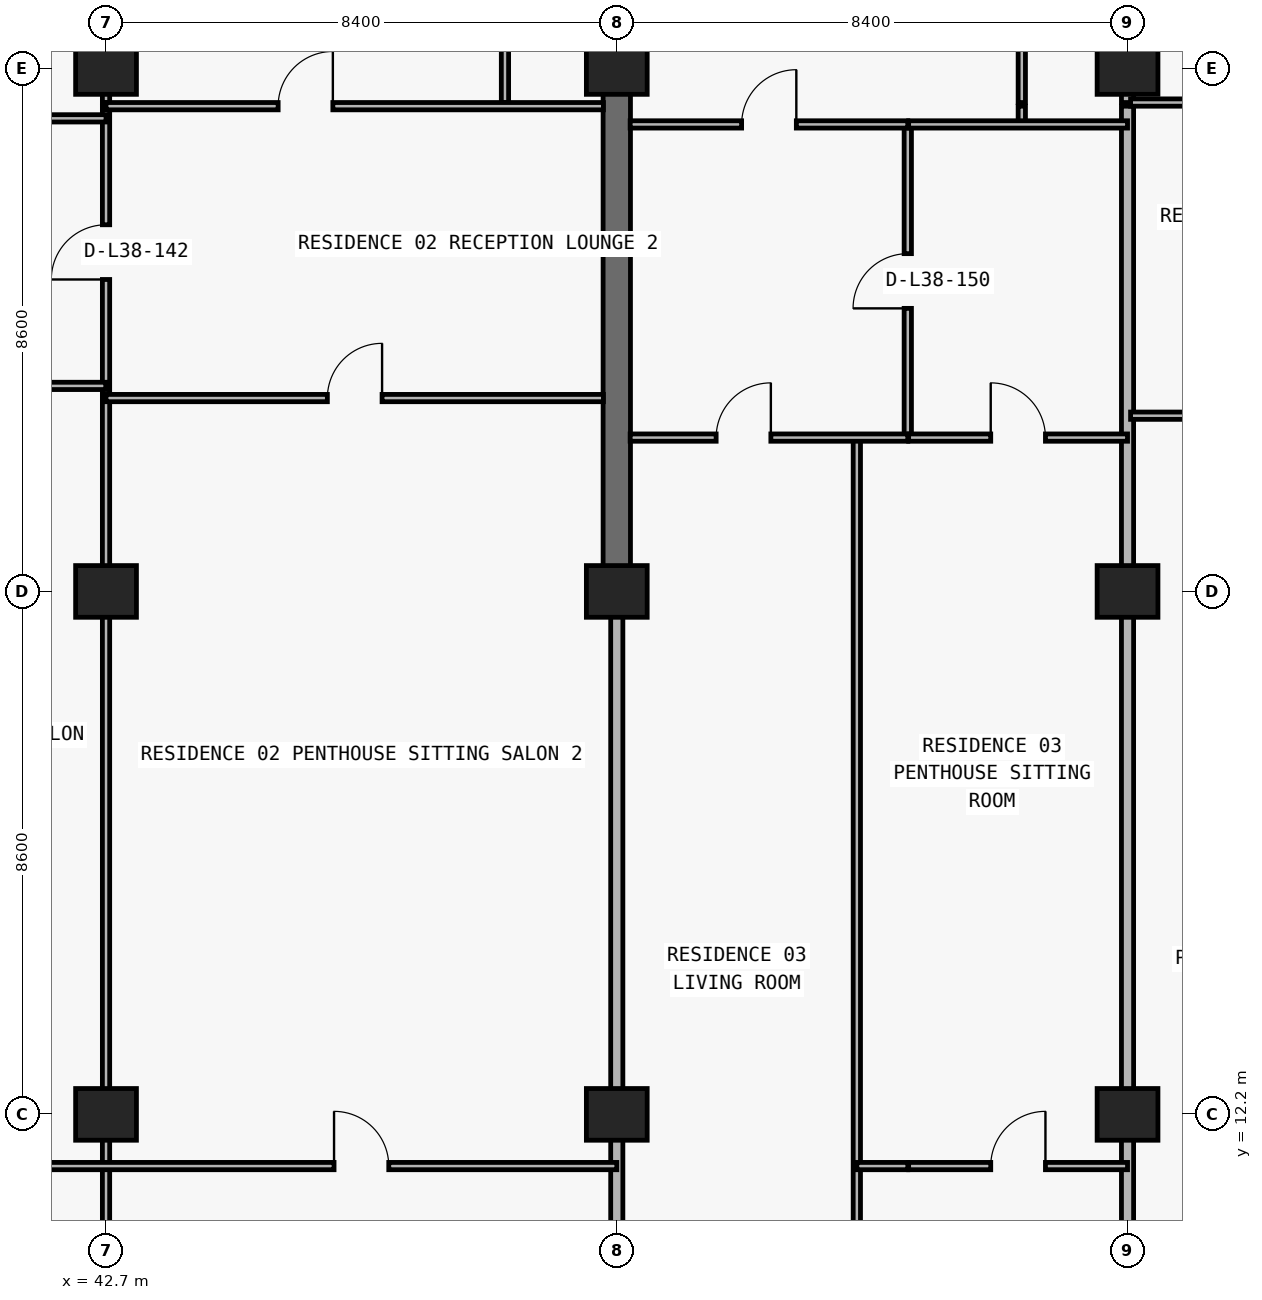
"""IFC4 building model, lengths in metres.
Left out: names, types, materials, properties, quantities, classifications, styles, units other than length and angle.
Written with IfcOpenShell. Run it as: python <this file> out.ifc"""

import sys

from ifc_helpers import new_model, si_unit, direction, frame, frame_2d, origin, origin_2d, place, context, subcontext, project, spatial, rectangle, extrude, element, fill, save


model = new_model("IFC4")
c1 = context("Model", 3, precision=1e-05, world=origin(), true_north=direction((0.0, 1.0)))
c2 = subcontext(c1, "Body", "Model", "MODEL_VIEW")
j1 = project(units=[si_unit("LENGTHUNIT", "METRE"), si_unit("PLANEANGLEUNIT", "RADIAN")], contexts=[c1])
p1 = place(None, origin())
s1 = spatial("IfcSite", under=j1, at=p1, CompositionType="ELEMENT")
p2 = place(p1, origin())
s2 = spatial("IfcBuilding", under=s1, at=p2, CompositionType="ELEMENT")
p3 = place(p2, frame((0.0, 0.0, 138.9)))
s3 = spatial("IfcBuildingStorey", under=s2, at=p3, CompositionType="ELEMENT", Elevation=138.9)
for number, where, z_axis, x_axis in (
    (1, (42.7, 12.2, 0.0), (0.0, 0.0, 1.0), (1.0, 0.0, 0.0)),
    (2, (51.1, 12.2, 0.0), (0.0, 0.0, 1.0), (1.0, 0.0, 0.0)),
    (3, (59.5, 12.2, 0.0), (0.0, 0.0, 1.0), (1.0, 0.0, 0.0)),
    (4, (42.7, 20.8, 0.0), (0.0, 0.0, 1.0), (1.0, 0.0, 0.0)),
    (5, (51.1, 20.8, 0.0), (0.0, 0.0, 1.0), (1.0, 0.0, 0.0)),
    (6, (59.5, 20.8, 0.0), (0.0, 0.0, 1.0), (1.0, 0.0, 0.0)),
    (7, (42.7, 29.4, 0.0), (0.0, 0.0, 1.0), (1.0, 0.0, 0.0)),
    (8, (51.1, 29.4, 0.0), (0.0, 0.0, 1.0), (1.0, 0.0, 0.0)),
    (9, (59.5, 29.4, 0.0), (0.0, 0.0, 1.0), (1.0, 0.0, 0.0)),
):
    element("IfcColumn", number, at=place(p3, frame(where, z_axis=z_axis, x_axis=x_axis)), inside=s3, PredefinedType="COLUMN", context=c2, shape_type="SweptSolid", body=[
        extrude(rectangle(XDim=1.0, YDim=0.85, at=origin_2d()), origin(), (0.0, 0.0, 1.0), 3.05),
    ])
p4 = place(p3, frame((51.1, 20.8, 0.0), z_axis=(0.0, 0.0, 1.0), x_axis=(0.0, 1.0, 0.0)))
e10 = element("IfcWall", 10, at=p4, inside=s3, PredefinedType="SHEAR", context=c2, shape_type="SweptSolid", body=[
    extrude(rectangle(XDim=8.6, YDim=0.45, at=frame_2d((4.3, 0.0))), origin(), (0.0, 0.0, 1.0), 3.05),
])
p5 = place(p3, frame((42.7, 8.84, 0.0), z_axis=(0.0, 0.0, 1.0), x_axis=(0.0, 1.0, 0.0)))
e11 = element("IfcWall", 11, at=p5, inside=s3, PredefinedType="PARTITIONING", context=c2, shape_type="SweptSolid", body=[
    extrude(rectangle(XDim=19.94, YDim=0.12, at=frame_2d((9.97, 0.0))), origin(), (0.0, 0.0, 1.0), 2.174),
])
p6 = place(p5, frame((17.09, 0.0, 0.0)))
e12 = element("IfcOpeningElement", 12, at=p6, cuts=e11, PredefinedType="OPENING", context=c2, shape_type="SweptSolid", body=[
    extrude(rectangle(XDim=0.9, YDim=2.124, at=frame_2d((0.45, 1.062))), frame((0.0, 0.07, 0.0), z_axis=(0.0, -1.0, 0.0), x_axis=(1.0, 0.0, 0.0)), (0.0, 0.0, 1.0), 0.14),
])
p7 = place(p3, frame((42.7, 28.84, 0.0), z_axis=(0.0, 0.0, 1.0), x_axis=(0.0, 1.0, 0.0)))
e13 = element("IfcWall", 13, at=p7, inside=s3, PredefinedType="PARTITIONING", context=c2, shape_type="SweptSolid", body=[
    extrude(rectangle(XDim=5.16, YDim=0.12, at=frame_2d((2.58, 0.0))), origin(), (0.0, 0.0, 1.0), 2.174),
])
p8 = place(p3, frame((49.261, 28.84, 0.0), z_axis=(0.0, 0.0, 1.0), x_axis=(0.0, 1.0, 0.0)))
e14 = element("IfcWall", 14, at=p8, inside=s3, PredefinedType="PARTITIONING", context=c2, shape_type="SweptSolid", body=[
    extrude(rectangle(XDim=5.16, YDim=0.12, at=frame_2d((2.58, 0.0))), origin(), (0.0, 0.0, 1.0), 3.05),
])
p9 = place(p8, frame((2.155, 0.0, 0.0)))
e15 = element("IfcOpeningElement", 15, at=p9, cuts=e14, PredefinedType="OPENING", context=c2, shape_type="SweptSolid", body=[
    extrude(rectangle(XDim=0.85, YDim=2.1, at=frame_2d((0.425, 1.05))), frame((0.0, 0.07, 0.0), z_axis=(0.0, -1.0, 0.0), x_axis=(1.0, 0.0, 0.0)), (0.0, 0.0, 1.0), 0.14),
])
p10 = place(p3, frame((51.1, 8.84, 0.0), z_axis=(0.0, 0.0, 1.0), x_axis=(0.0, 1.0, 0.0)))
e16 = element("IfcWall", 16, at=p10, inside=s3, PredefinedType="PARTITIONING", context=c2, shape_type="SweptSolid", body=[
    extrude(rectangle(XDim=11.955, YDim=0.2, at=frame_2d((5.978, 0.0))), origin(), (0.0, 0.0, 1.0), 2.174),
])
p11 = place(p3, frame((51.1, 29.405, 0.0), z_axis=(0.0, 0.0, 1.0), x_axis=(0.0, 1.0, 0.0)))
e17 = element("IfcWall", 17, at=p11, inside=s3, PredefinedType="PARTITIONING", context=c2, shape_type="SweptSolid", body=[
    extrude(rectangle(XDim=4.595, YDim=0.2, at=frame_2d((2.297, 0.0))), origin(), (0.0, 0.0, 1.0), 2.335),
])
p12 = place(p3, frame((55.048, 8.84, 0.0), z_axis=(0.0, 0.0, 1.0), x_axis=(0.0, 1.0, 0.0)))
e18 = element("IfcWall", 18, at=p12, inside=s3, PredefinedType="PARTITIONING", context=c2, shape_type="SweptSolid", body=[
    extrude(rectangle(XDim=14.49, YDim=0.12, at=frame_2d((7.245, 0.0))), origin(), (0.0, 0.0, 1.0), 3.05),
])
p13 = place(p3, frame((55.886, 23.33, 0.0), z_axis=(0.0, 0.0, 1.0), x_axis=(0.0, 1.0, 0.0)))
e19 = element("IfcWall", 19, at=p13, inside=s3, PredefinedType="PARTITIONING", context=c2, shape_type="SweptSolid", body=[
    extrude(rectangle(XDim=5.15, YDim=0.12, at=frame_2d((2.575, 0.0))), origin(), (0.0, 0.0, 1.0), 3.05),
])
p14 = place(p13, frame((2.125, 0.0, 0.0)))
e20 = element("IfcOpeningElement", 20, at=p14, cuts=e19, PredefinedType="OPENING", context=c2, shape_type="SweptSolid", body=[
    extrude(rectangle(XDim=0.9, YDim=2.15, at=frame_2d((0.45, 1.075))), frame((0.0, 0.07, 0.0), z_axis=(0.0, -1.0, 0.0), x_axis=(1.0, 0.0, 0.0)), (0.0, 0.0, 1.0), 0.14),
])
p15 = place(p3, frame((57.761, 28.48, 0.0), z_axis=(0.0, 0.0, 1.0), x_axis=(0.0, 1.0, 0.0)))
e21 = element("IfcWall", 21, at=p15, inside=s3, PredefinedType="PARTITIONING", context=c2, shape_type="SweptSolid", body=[
    extrude(rectangle(XDim=0.3, YDim=0.12, at=frame_2d((0.15, 0.0))), origin(), (0.0, 0.0, 1.0), 3.05),
])
p16 = place(p3, frame((57.761, 28.84, 0.0), z_axis=(0.0, 0.0, 1.0), x_axis=(0.0, 1.0, 0.0)))
e22 = element("IfcWall", 22, at=p16, inside=s3, PredefinedType="PARTITIONING", context=c2, shape_type="SweptSolid", body=[
    extrude(rectangle(XDim=5.16, YDim=0.12, at=frame_2d((2.58, 0.0))), origin(), (0.0, 0.0, 1.0), 3.05),
])
p17 = place(p16, frame((2.155, 0.0, 0.0)))
e23 = element("IfcOpeningElement", 23, at=p17, cuts=e22, PredefinedType="OPENING", context=c2, shape_type="SweptSolid", body=[
    extrude(rectangle(XDim=0.85, YDim=2.1, at=frame_2d((0.425, 1.05))), frame((0.0, 0.07, 0.0), z_axis=(0.0, -1.0, 0.0), x_axis=(1.0, 0.0, 0.0)), (0.0, 0.0, 1.0), 0.14),
])
p18 = place(p3, frame((59.5, 8.84, 0.0), z_axis=(0.0, 0.0, 1.0), x_axis=(0.0, 1.0, 0.0)))
e24 = element("IfcWall", 24, at=p18, inside=s3, PredefinedType="PARTITIONING", context=c2, shape_type="SweptSolid", body=[
    extrude(rectangle(XDim=19.94, YDim=0.2, at=frame_2d((9.97, 0.0))), origin(), (0.0, 0.0, 1.0), 2.174),
])
p19 = place(p3, frame((59.5, 28.84, 0.0), z_axis=(0.0, 0.0, 1.0), x_axis=(0.0, 1.0, 0.0)))
e25 = element("IfcWall", 25, at=p19, inside=s3, PredefinedType="PARTITIONING", context=c2, shape_type="SweptSolid", body=[
    extrude(rectangle(XDim=5.16, YDim=0.2, at=frame_2d((2.58, 0.0))), origin(), (0.0, 0.0, 1.0), 2.174),
])
p20 = place(p3, frame((35.1, 11.35, 0.0), z_axis=(0.0, 0.0, 1.0), x_axis=(1.0, 0.0, 0.0)))
e26 = element("IfcWall", 26, at=p20, inside=s3, PredefinedType="PARTITIONING", context=c2, shape_type="SweptSolid", body=[
    extrude(rectangle(XDim=16.0, YDim=0.12, at=frame_2d((8.0, 0.0))), origin(), (0.0, 0.0, 1.0), 3.05),
])
p21 = place(p20, frame((3.35, 0.0, 0.0)))
e27 = element("IfcOpeningElement", 27, at=p21, cuts=e26, PredefinedType="OPENING", context=c2, shape_type="SweptSolid", body=[
    extrude(rectangle(XDim=0.9, YDim=2.15, at=frame_2d((0.45, 1.075))), frame((0.0, 0.07, 0.0), z_axis=(0.0, -1.0, 0.0), x_axis=(1.0, 0.0, 0.0)), (0.0, 0.0, 1.0), 0.14),
])
p22 = place(p20, frame((11.35, 0.0, 0.0)))
e28 = element("IfcOpeningElement", 28, at=p22, cuts=e26, PredefinedType="OPENING", context=c2, shape_type="SweptSolid", body=[
    extrude(rectangle(XDim=0.9, YDim=2.15, at=frame_2d((0.45, 1.075))), frame((0.0, 0.07, 0.0), z_axis=(0.0, -1.0, 0.0), x_axis=(1.0, 0.0, 0.0)), (0.0, 0.0, 1.0), 0.14),
])
p23 = place(p3, frame((55.048, 11.35, 0.0), z_axis=(0.0, 0.0, 1.0), x_axis=(1.0, 0.0, 0.0)))
e29 = element("IfcWall", 29, at=p23, inside=s3, PredefinedType="PARTITIONING", context=c2, shape_type="SweptSolid", body=[
    extrude(rectangle(XDim=0.838, YDim=0.12, at=frame_2d((0.419, 0.0))), origin(), (0.0, 0.0, 1.0), 3.05),
])
p24 = place(p3, frame((55.9, 11.35, 0.0), z_axis=(0.0, 0.0, 1.0), x_axis=(1.0, 0.0, 0.0)))
e30 = element("IfcWall", 30, at=p24, inside=s3, PredefinedType="PARTITIONING", context=c2, shape_type="SweptSolid", body=[
    extrude(rectangle(XDim=3.6, YDim=0.12, at=frame_2d((1.8, 0.0))), origin(), (0.0, 0.0, 1.0), 3.05),
])
p25 = place(p24, frame((1.35, 0.0, 0.0)))
e31 = element("IfcOpeningElement", 31, at=p25, cuts=e30, PredefinedType="OPENING", context=c2, shape_type="SweptSolid", body=[
    extrude(rectangle(XDim=0.9, YDim=2.15, at=frame_2d((0.45, 1.075))), frame((0.0, 0.07, 0.0), z_axis=(0.0, -1.0, 0.0), x_axis=(1.0, 0.0, 0.0)), (0.0, 0.0, 1.0), 0.14),
])
p26 = place(p3, frame((51.32, 23.33, 0.0), z_axis=(0.0, 0.0, 1.0), x_axis=(1.0, 0.0, 0.0)))
e32 = element("IfcWall", 32, at=p26, inside=s3, PredefinedType="PARTITIONING", context=c2, shape_type="SweptSolid", body=[
    extrude(rectangle(XDim=4.566, YDim=0.12, at=frame_2d((2.283, 0.0))), origin(), (0.0, 0.0, 1.0), 3.05),
])
p27 = place(p26, frame((1.414, 0.0, 0.0)))
e33 = element("IfcOpeningElement", 33, at=p27, cuts=e32, PredefinedType="OPENING", context=c2, shape_type="SweptSolid", body=[
    extrude(rectangle(XDim=0.9, YDim=2.15, at=frame_2d((0.45, 1.075))), frame((0.0, 0.07, 0.0), z_axis=(0.0, -1.0, 0.0), x_axis=(1.0, 0.0, 0.0)), (0.0, 0.0, 1.0), 0.14),
])
p28 = place(p3, frame((55.9, 23.33, 0.0), z_axis=(0.0, 0.0, 1.0), x_axis=(1.0, 0.0, 0.0)))
e34 = element("IfcWall", 34, at=p28, inside=s3, PredefinedType="PARTITIONING", context=c2, shape_type="SweptSolid", body=[
    extrude(rectangle(XDim=3.6, YDim=0.12, at=frame_2d((1.8, 0.0))), origin(), (0.0, 0.0, 1.0), 3.05),
])
p29 = place(p28, frame((1.35, 0.0, 0.0)))
e35 = element("IfcOpeningElement", 35, at=p29, cuts=e34, PredefinedType="OPENING", context=c2, shape_type="SweptSolid", body=[
    extrude(rectangle(XDim=0.9, YDim=2.15, at=frame_2d((0.45, 1.075))), frame((0.0, 0.07, 0.0), z_axis=(0.0, -1.0, 0.0), x_axis=(1.0, 0.0, 0.0)), (0.0, 0.0, 1.0), 0.14),
])
p30 = place(p3, frame((59.55, 23.69, 0.0), z_axis=(0.0, 0.0, 1.0), x_axis=(1.0, 0.0, 0.0)))
e36 = element("IfcWall", 36, at=p30, inside=s3, PredefinedType="PARTITIONING", context=c2, shape_type="SweptSolid", body=[
    extrude(rectangle(XDim=8.35, YDim=0.12, at=frame_2d((4.175, 0.0))), origin(), (0.0, 0.0, 1.0), 3.05),
])
p31 = place(p30, frame((1.668, 0.0, 0.0)))
e37 = element("IfcOpeningElement", 37, at=p31, cuts=e36, PredefinedType="OPENING", context=c2, shape_type="SweptSolid", body=[
    extrude(rectangle(XDim=0.9, YDim=2.15, at=frame_2d((0.45, 1.075))), frame((0.0, 0.07, 0.0), z_axis=(0.0, -1.0, 0.0), x_axis=(1.0, 0.0, 0.0)), (0.0, 0.0, 1.0), 0.14),
])
p32 = place(p30, frame((6.01, 0.0, 0.0)))
e38 = element("IfcOpeningElement", 38, at=p32, cuts=e36, PredefinedType="OPENING", context=c2, shape_type="SweptSolid", body=[
    extrude(rectangle(XDim=0.9, YDim=2.15, at=frame_2d((0.45, 1.075))), frame((0.0, 0.07, 0.0), z_axis=(0.0, -1.0, 0.0), x_axis=(1.0, 0.0, 0.0)), (0.0, 0.0, 1.0), 0.14),
])
p33 = place(p3, frame((42.7, 23.98, 0.0), z_axis=(0.0, 0.0, 1.0), x_axis=(1.0, 0.0, 0.0)))
e39 = element("IfcWall", 39, at=p33, inside=s3, PredefinedType="PARTITIONING", context=c2, shape_type="SweptSolid", body=[
    extrude(rectangle(XDim=8.18, YDim=0.12, at=frame_2d((4.09, 0.0))), origin(), (0.0, 0.0, 1.0), 3.05),
])
p34 = place(p33, frame((3.64, 0.0, 0.0)))
e40 = element("IfcOpeningElement", 40, at=p34, cuts=e39, PredefinedType="OPENING", context=c2, shape_type="SweptSolid", body=[
    extrude(rectangle(XDim=0.9, YDim=2.15, at=frame_2d((0.45, 1.075))), frame((0.0, 0.07, 0.0), z_axis=(0.0, -1.0, 0.0), x_axis=(1.0, 0.0, 0.0)), (0.0, 0.0, 1.0), 0.14),
])
p35 = place(p3, frame((35.105, 24.18, 0.0), z_axis=(0.0, 0.0, 1.0), x_axis=(1.0, 0.0, 0.0)))
e41 = element("IfcWall", 41, at=p35, inside=s3, PredefinedType="PARTITIONING", context=c2, shape_type="SweptSolid", body=[
    extrude(rectangle(XDim=7.59, YDim=0.12, at=frame_2d((3.795, 0.0))), origin(), (0.0, 0.0, 1.0), 3.05),
])
p36 = place(p35, frame((3.345, 0.0, 0.0)))
e42 = element("IfcOpeningElement", 42, at=p36, cuts=e41, PredefinedType="OPENING", context=c2, shape_type="SweptSolid", body=[
    extrude(rectangle(XDim=0.9, YDim=2.15, at=frame_2d((0.45, 1.075))), frame((0.0, 0.07, 0.0), z_axis=(0.0, -1.0, 0.0), x_axis=(1.0, 0.0, 0.0)), (0.0, 0.0, 1.0), 0.14),
])
p37 = place(p3, frame((51.32, 28.48, 0.0), z_axis=(0.0, 0.0, 1.0), x_axis=(1.0, 0.0, 0.0)))
e43 = element("IfcWall", 43, at=p37, inside=s3, PredefinedType="PARTITIONING", context=c2, shape_type="SweptSolid", body=[
    extrude(rectangle(XDim=4.566, YDim=0.12, at=frame_2d((2.283, 0.0))), origin(), (0.0, 0.0, 1.0), 3.05),
])
p38 = place(p37, frame((1.833, 0.0, 0.0)))
e44 = element("IfcOpeningElement", 44, at=p38, cuts=e43, PredefinedType="OPENING", context=c2, shape_type="SweptSolid", body=[
    extrude(rectangle(XDim=0.9, YDim=2.15, at=frame_2d((0.45, 1.075))), frame((0.0, 0.07, 0.0), z_axis=(0.0, -1.0, 0.0), x_axis=(1.0, 0.0, 0.0)), (0.0, 0.0, 1.0), 0.14),
])
p39 = place(p3, frame((55.9, 28.48, 0.0), z_axis=(0.0, 0.0, 1.0), x_axis=(1.0, 0.0, 0.0)))
e45 = element("IfcWall", 45, at=p39, inside=s3, PredefinedType="PARTITIONING", context=c2, shape_type="SweptSolid", body=[
    extrude(rectangle(XDim=3.6, YDim=0.12, at=frame_2d((1.8, 0.0))), origin(), (0.0, 0.0, 1.0), 3.05),
])
p40 = place(p3, frame((35.1, 28.58, 0.0), z_axis=(0.0, 0.0, 1.0), x_axis=(1.0, 0.0, 0.0)))
e46 = element("IfcWall", 46, at=p40, inside=s3, PredefinedType="PARTITIONING", context=c2, shape_type="SweptSolid", body=[
    extrude(rectangle(XDim=7.6, YDim=0.12, at=frame_2d((3.8, 0.0))), origin(), (0.0, 0.0, 1.0), 3.05),
])
p41 = place(p40, frame((2.418, 0.0, 0.0)))
e47 = element("IfcOpeningElement", 47, at=p41, cuts=e46, PredefinedType="OPENING", context=c2, shape_type="SweptSolid", body=[
    extrude(rectangle(XDim=0.9, YDim=2.15, at=frame_2d((0.45, 1.075))), frame((0.0, 0.07, 0.0), z_axis=(0.0, -1.0, 0.0), x_axis=(1.0, 0.0, 0.0)), (0.0, 0.0, 1.0), 0.14),
])
p42 = place(p3, frame((42.7, 28.78, 0.0), z_axis=(0.0, 0.0, 1.0), x_axis=(1.0, 0.0, 0.0)))
e48 = element("IfcWall", 48, at=p42, inside=s3, PredefinedType="PARTITIONING", context=c2, shape_type="SweptSolid", body=[
    extrude(rectangle(XDim=8.18, YDim=0.12, at=frame_2d((4.09, 0.0))), origin(), (0.0, 0.0, 1.0), 3.05),
])
p43 = place(p42, frame((2.831, 0.0, 0.0)))
e49 = element("IfcOpeningElement", 49, at=p43, cuts=e48, PredefinedType="OPENING", context=c2, shape_type="SweptSolid", body=[
    extrude(rectangle(XDim=0.9, YDim=2.15, at=frame_2d((0.45, 1.075))), frame((0.0, 0.07, 0.0), z_axis=(0.0, -1.0, 0.0), x_axis=(1.0, 0.0, 0.0)), (0.0, 0.0, 1.0), 0.14),
])
p44 = place(p3, frame((59.55, 28.84, 0.0), z_axis=(0.0, 0.0, 1.0), x_axis=(1.0, 0.0, 0.0)))
e50 = element("IfcWall", 50, at=p44, inside=s3, PredefinedType="PARTITIONING", context=c2, shape_type="SweptSolid", body=[
    extrude(rectangle(XDim=8.35, YDim=0.12, at=frame_2d((4.175, 0.0))), origin(), (0.0, 0.0, 1.0), 3.05),
])
p45 = place(p44, frame((1.668, 0.0, 0.0)))
e51 = element("IfcOpeningElement", 51, at=p45, cuts=e50, PredefinedType="OPENING", context=c2, shape_type="SweptSolid", body=[
    extrude(rectangle(XDim=0.9, YDim=2.15, at=frame_2d((0.45, 1.075))), frame((0.0, 0.07, 0.0), z_axis=(0.0, -1.0, 0.0), x_axis=(1.0, 0.0, 0.0)), (0.0, 0.0, 1.0), 0.14),
])
p46 = place(p6, origin())
e52 = element("IfcDoor", 52, at=p46, inside=s3, OperationType="SINGLE_SWING_LEFT", PredefinedType="DOOR", context=c2, shape_type="SweptSolid", body=[
    extrude(rectangle(XDim=0.9, YDim=2.124, at=frame_2d((0.45, 1.062))), frame((0.0, 0.025, 0.0), z_axis=(0.0, -1.0, 0.0), x_axis=(1.0, 0.0, 0.0)), (0.0, 0.0, 1.0), 0.05),
])
fill(e12, e52)
p47 = place(p43, origin())
e53 = element("IfcDoor", 53, at=p47, inside=s3, OperationType="SINGLE_SWING_RIGHT", PredefinedType="DOOR", context=c2, shape_type="SweptSolid", body=[
    extrude(rectangle(XDim=0.9, YDim=2.15, at=frame_2d((0.45, 1.075))), frame((0.0, 0.025, 0.0), z_axis=(0.0, -1.0, 0.0), x_axis=(1.0, 0.0, 0.0)), (0.0, 0.0, 1.0), 0.05),
])
fill(e49, e53)
p48 = place(p34, origin())
e54 = element("IfcDoor", 54, at=p48, inside=s3, OperationType="SINGLE_SWING_RIGHT", PredefinedType="DOOR", context=c2, shape_type="SweptSolid", body=[
    extrude(rectangle(XDim=0.9, YDim=2.15, at=frame_2d((0.45, 1.075))), frame((0.0, 0.025, 0.0), z_axis=(0.0, -1.0, 0.0), x_axis=(1.0, 0.0, 0.0)), (0.0, 0.0, 1.0), 0.05),
])
fill(e40, e54)
p49 = place(p22, origin())
e55 = element("IfcDoor", 55, at=p49, inside=s3, OperationType="SINGLE_SWING_LEFT", PredefinedType="DOOR", context=c2, shape_type="SweptSolid", body=[
    extrude(rectangle(XDim=0.9, YDim=2.15, at=frame_2d((0.45, 1.075))), frame((0.0, 0.025, 0.0), z_axis=(0.0, -1.0, 0.0), x_axis=(1.0, 0.0, 0.0)), (0.0, 0.0, 1.0), 0.05),
])
fill(e28, e55)
p50 = place(p38, origin())
e56 = element("IfcDoor", 56, at=p50, inside=s3, OperationType="SINGLE_SWING_RIGHT", PredefinedType="DOOR", context=c2, shape_type="SweptSolid", body=[
    extrude(rectangle(XDim=0.9, YDim=2.15, at=frame_2d((0.45, 1.075))), frame((0.0, 0.025, 0.0), z_axis=(0.0, -1.0, 0.0), x_axis=(1.0, 0.0, 0.0)), (0.0, 0.0, 1.0), 0.05),
])
fill(e44, e56)
p51 = place(p14, origin())
e57 = element("IfcDoor", 57, at=p51, inside=s3, OperationType="SINGLE_SWING_LEFT", PredefinedType="DOOR", context=c2, shape_type="SweptSolid", body=[
    extrude(rectangle(XDim=0.9, YDim=2.15, at=frame_2d((0.45, 1.075))), frame((0.0, 0.025, 0.0), z_axis=(0.0, -1.0, 0.0), x_axis=(1.0, 0.0, 0.0)), (0.0, 0.0, 1.0), 0.05),
])
fill(e20, e57)
p52 = place(p27, origin())
e58 = element("IfcDoor", 58, at=p52, inside=s3, OperationType="SINGLE_SWING_RIGHT", PredefinedType="DOOR", context=c2, shape_type="SweptSolid", body=[
    extrude(rectangle(XDim=0.9, YDim=2.15, at=frame_2d((0.45, 1.075))), frame((0.0, 0.025, 0.0), z_axis=(0.0, -1.0, 0.0), x_axis=(1.0, 0.0, 0.0)), (0.0, 0.0, 1.0), 0.05),
])
fill(e33, e58)
p53 = place(p29, origin())
e59 = element("IfcDoor", 59, at=p53, inside=s3, OperationType="SINGLE_SWING_LEFT", PredefinedType="DOOR", context=c2, shape_type="SweptSolid", body=[
    extrude(rectangle(XDim=0.9, YDim=2.15, at=frame_2d((0.45, 1.075))), frame((0.0, 0.025, 0.0), z_axis=(0.0, -1.0, 0.0), x_axis=(1.0, 0.0, 0.0)), (0.0, 0.0, 1.0), 0.05),
])
fill(e35, e59)
p54 = place(p25, origin())
e60 = element("IfcDoor", 60, at=p54, inside=s3, OperationType="SINGLE_SWING_RIGHT", PredefinedType="DOOR", context=c2, shape_type="SweptSolid", body=[
    extrude(rectangle(XDim=0.9, YDim=2.15, at=frame_2d((0.45, 1.075))), frame((0.0, 0.025, 0.0), z_axis=(0.0, -1.0, 0.0), x_axis=(1.0, 0.0, 0.0)), (0.0, 0.0, 1.0), 0.05),
])
fill(e31, e60)
save(model, sys.argv[1])
